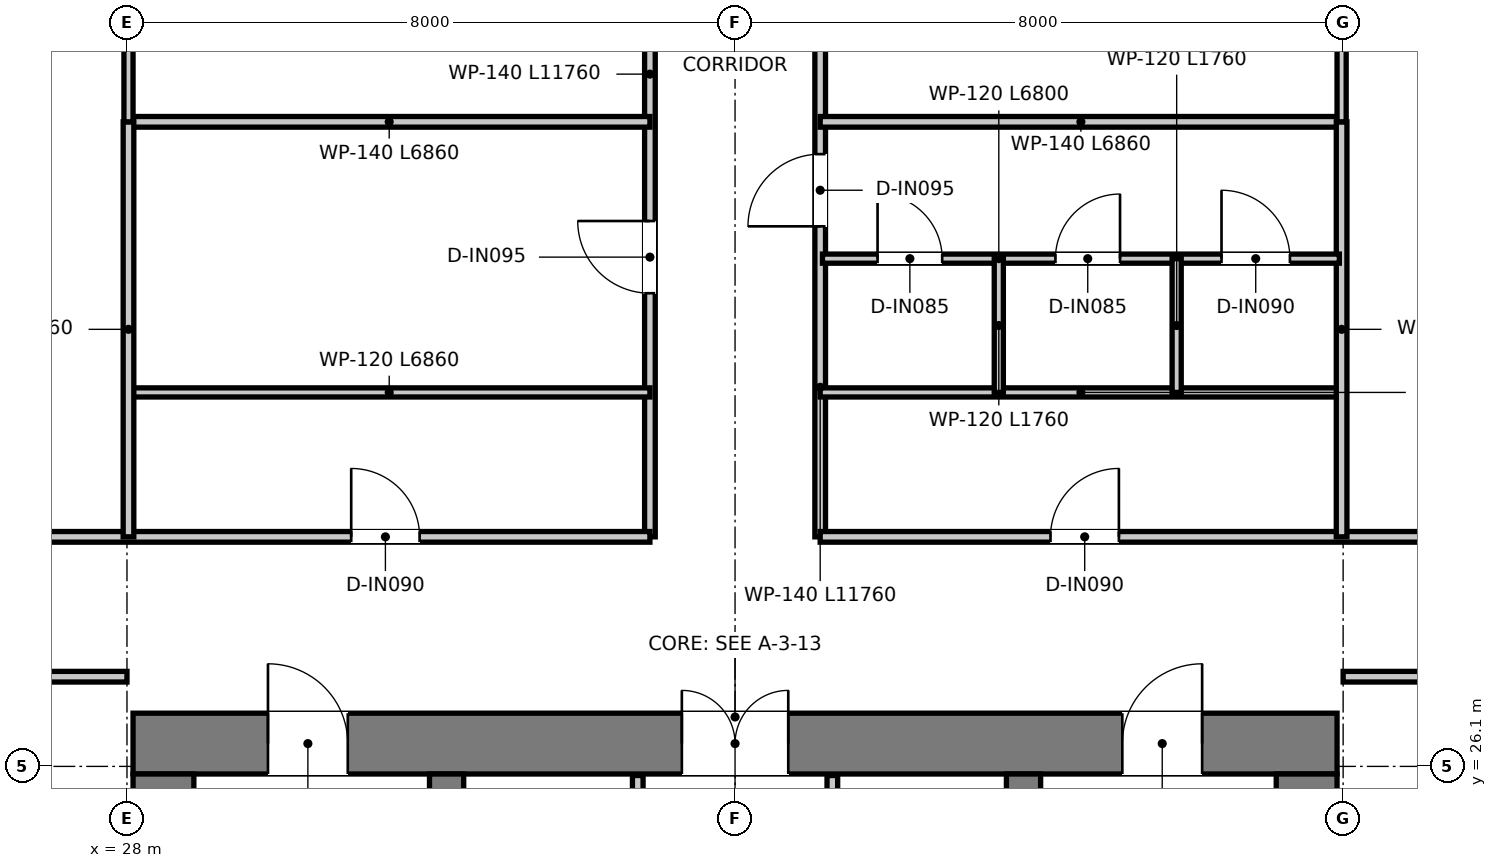
"""IFC4 building model, lengths in metres.
Left out: names, types, materials, properties, quantities, classifications, styles, units other than length and angle.
Written with IfcOpenShell. Run it as: python <this file> out.ifc"""

import sys

from ifc_helpers import new_model, si_unit, direction, frame, frame_2d, origin, place, context, subcontext, project, spatial, rectangle, extrude, element, fill, save


model = new_model("IFC4")
c1 = context("Model", 3, precision=1e-05, world=origin(), true_north=direction((0.0, 1.0)))
c2 = subcontext(c1, "Body", "Model", "MODEL_VIEW")
j1 = project(units=[si_unit("LENGTHUNIT", "METRE"), si_unit("PLANEANGLEUNIT", "RADIAN")], contexts=[c1])
p1 = place(None, origin())
s1 = spatial("IfcSite", under=j1, at=p1, CompositionType="ELEMENT")
p2 = place(p1, origin())
s2 = spatial("IfcBuilding", under=s1, at=p2, CompositionType="ELEMENT")
p3 = place(p2, frame((0.0, 0.0, 150.15)))
s3 = spatial("IfcBuildingStorey", under=s2, at=p3, CompositionType="ELEMENT", Elevation=150.15)
p4 = place(p3, frame((28.08, 26.4, 0.0), z_axis=(0.0, 0.0, 1.0), x_axis=(1.0, 0.0, 0.0)))
e1 = element("IfcWall", 1, at=p4, inside=s3, PredefinedType="SHEAR", context=c2, shape_type="SweptSolid", body=[
    extrude(rectangle(XDim=15.84, YDim=0.8, at=frame_2d((7.92, 0.0))), origin(), (0.0, 0.0, 1.0), 3.95),
])
p5 = place(p4, frame((7.22, 0.0, 0.0)))
e2 = element("IfcOpeningElement", 2, at=p5, cuts=e1, PredefinedType="OPENING", context=c2, shape_type="SweptSolid", body=[
    extrude(rectangle(XDim=1.4, YDim=2.2, at=frame_2d((0.7, 1.1))), frame((0.0, 0.41, 0.0), z_axis=(0.0, -1.0, 0.0), x_axis=(1.0, 0.0, 0.0)), (0.0, 0.0, 1.0), 0.82),
])
p6 = place(p4, frame((1.775, 0.0, 0.0)))
e3 = element("IfcOpeningElement", 3, at=p6, cuts=e1, PredefinedType="OPENING", context=c2, shape_type="SweptSolid", body=[
    extrude(rectangle(XDim=1.05, YDim=2.1, at=frame_2d((0.525, 1.05))), frame((0.0, 0.41, 0.0), z_axis=(0.0, -1.0, 0.0), x_axis=(1.0, 0.0, 0.0)), (0.0, 0.0, 1.0), 0.82),
])
p7 = place(p4, frame((13.015, 0.0, 0.0)))
e4 = element("IfcOpeningElement", 4, at=p7, cuts=e1, PredefinedType="OPENING", context=c2, shape_type="SweptSolid", body=[
    extrude(rectangle(XDim=1.05, YDim=2.1, at=frame_2d((0.525, 1.05))), frame((0.0, 0.41, 0.0), z_axis=(0.0, -1.0, 0.0), x_axis=(1.0, 0.0, 0.0)), (0.0, 0.0, 1.0), 0.82),
])
for number, where, z_axis, x_axis in (
    (5, (28.48, 11.3, 0.0), (0.0, 0.0, 1.0), (0.0, 1.0, 0.0)),
    (6, (43.52, 11.3, 0.0), (0.0, 0.0, 1.0), (0.0, 1.0, 0.0)),
):
    element("IfcWall", number, at=place(p3, frame(where, z_axis=z_axis, x_axis=x_axis)), inside=s3, PredefinedType="SHEAR", context=c2, shape_type="SweptSolid", body=[
        extrude(rectangle(XDim=14.7, YDim=0.8, at=frame_2d((7.35, 0.0))), origin(), (0.0, 0.0, 1.0), 3.95),
    ])
p8 = place(p3, frame((32.205, 13.22, 0.0), z_axis=(0.0, 0.0, 1.0), x_axis=(0.0, 1.0, 0.0)))
e7 = element("IfcWall", 7, at=p8, inside=s3, PredefinedType="SHEAR", context=c2, shape_type="SweptSolid", body=[
    extrude(rectangle(XDim=12.78, YDim=0.45, at=frame_2d((6.39, 0.0))), origin(), (0.0, 0.0, 1.0), 3.95),
])
p9 = place(p8, frame((10.58, 0.0, 0.0)))
e8 = element("IfcOpeningElement", 8, at=p9, cuts=e7, PredefinedType="OPENING", context=c2, shape_type="SweptSolid", body=[
    extrude(rectangle(XDim=1.1, YDim=2.15, at=frame_2d((0.55, 1.075))), frame((0.0, 0.235, 0.0), z_axis=(0.0, -1.0, 0.0), x_axis=(1.0, 0.0, 0.0)), (0.0, 0.0, 1.0), 0.47),
])
p10 = place(p3, frame((39.795, 13.22, 0.0), z_axis=(0.0, 0.0, 1.0), x_axis=(0.0, 1.0, 0.0)))
e9 = element("IfcWall", 9, at=p10, inside=s3, PredefinedType="SHEAR", context=c2, shape_type="SweptSolid", body=[
    extrude(rectangle(XDim=12.78, YDim=0.45, at=frame_2d((6.39, 0.0))), origin(), (0.0, 0.0, 1.0), 3.95),
])
p11 = place(p10, frame((10.58, 0.0, 0.0)))
e10 = element("IfcOpeningElement", 10, at=p11, cuts=e9, PredefinedType="OPENING", context=c2, shape_type="SweptSolid", body=[
    extrude(rectangle(XDim=1.1, YDim=2.15, at=frame_2d((0.55, 1.075))), frame((0.0, 0.235, 0.0), z_axis=(0.0, -1.0, 0.0), x_axis=(1.0, 0.0, 0.0)), (0.0, 0.0, 1.0), 0.47),
])
p12 = place(p3, frame((34.72, 20.2, 0.0), z_axis=(0.0, 0.0, 1.0), x_axis=(0.0, 1.0, 0.0)))
e11 = element("IfcWall", 11, at=p12, inside=s3, PredefinedType="PARTITIONING", context=c2, shape_type="SweptSolid", body=[
    extrude(rectangle(XDim=5.78, YDim=0.14, at=frame_2d((2.89, 0.0))), origin(), (0.0, 0.0, 1.0), 2.67),
])
p13 = place(p12, frame((1.05, 0.0, 0.0)))
e12 = element("IfcOpeningElement", 12, at=p13, cuts=e11, PredefinedType="OPENING", context=c2, shape_type="SweptSolid", body=[
    extrude(rectangle(XDim=0.9, YDim=2.1, at=frame_2d((0.45, 1.05))), frame((0.0, 0.08, 0.0), z_axis=(0.0, -1.0, 0.0), x_axis=(1.0, 0.0, 0.0)), (0.0, 0.0, 1.0), 0.16),
])
p14 = place(p3, frame((37.28, 20.2, 0.0), z_axis=(0.0, 0.0, 1.0), x_axis=(0.0, 1.0, 0.0)))
e13 = element("IfcWall", 13, at=p14, inside=s3, PredefinedType="PARTITIONING", context=c2, shape_type="SweptSolid", body=[
    extrude(rectangle(XDim=5.78, YDim=0.14, at=frame_2d((2.89, 0.0))), origin(), (0.0, 0.0, 1.0), 2.67),
])
p15 = place(p14, frame((0.95, 0.0, 0.0)))
e14 = element("IfcOpeningElement", 14, at=p15, cuts=e13, PredefinedType="OPENING", context=c2, shape_type="SweptSolid", body=[
    extrude(rectangle(XDim=1.1, YDim=2.15, at=frame_2d((0.55, 1.075))), frame((0.0, 0.08, 0.0), z_axis=(0.0, -1.0, 0.0), x_axis=(1.0, 0.0, 0.0)), (0.0, 0.0, 1.0), 0.16),
])
p16 = place(p3, frame((34.88, 29.12, 0.0), z_axis=(0.0, 0.0, 1.0), x_axis=(0.0, 1.0, 0.0)))
e15 = element("IfcWall", 15, at=p16, inside=s3, PredefinedType="PARTITIONING", context=c2, shape_type="SweptSolid", body=[
    extrude(rectangle(XDim=11.76, YDim=0.14, at=frame_2d((5.88, 0.0))), origin(), (0.0, 0.0, 1.0), 3.03),
])
p17 = place(p16, frame((3.205, 0.0, 0.0)))
e16 = element("IfcOpeningElement", 16, at=p17, cuts=e15, PredefinedType="OPENING", context=c2, shape_type="SweptSolid", body=[
    extrude(rectangle(XDim=0.95, YDim=2.1, at=frame_2d((0.475, 1.05))), frame((0.0, 0.08, 0.0), z_axis=(0.0, -1.0, 0.0), x_axis=(1.0, 0.0, 0.0)), (0.0, 0.0, 1.0), 0.16),
])
p18 = place(p16, frame((8.02, 0.0, 0.0)))
e17 = element("IfcOpeningElement", 17, at=p18, cuts=e15, PredefinedType="OPENING", context=c2, shape_type="SweptSolid", body=[
    extrude(rectangle(XDim=0.9, YDim=2.1, at=frame_2d((0.45, 1.05))), frame((0.0, 0.08, 0.0), z_axis=(0.0, -1.0, 0.0), x_axis=(1.0, 0.0, 0.0)), (0.0, 0.0, 1.0), 0.16),
])
p19 = place(p3, frame((37.12, 29.12, 0.0), z_axis=(0.0, 0.0, 1.0), x_axis=(0.0, 1.0, 0.0)))
e18 = element("IfcWall", 18, at=p19, inside=s3, PredefinedType="PARTITIONING", context=c2, shape_type="SweptSolid", body=[
    extrude(rectangle(XDim=11.76, YDim=0.14, at=frame_2d((5.88, 0.0))), origin(), (0.0, 0.0, 1.0), 3.03),
])
p20 = place(p19, frame((4.085, 0.0, 0.0)))
e19 = element("IfcOpeningElement", 19, at=p20, cuts=e18, PredefinedType="OPENING", context=c2, shape_type="SweptSolid", body=[
    extrude(rectangle(XDim=0.95, YDim=2.1, at=frame_2d((0.475, 1.05))), frame((0.0, 0.08, 0.0), z_axis=(0.0, -1.0, 0.0), x_axis=(1.0, 0.0, 0.0)), (0.0, 0.0, 1.0), 0.16),
])
p21 = place(p19, frame((8.02, 0.0, 0.0)))
e20 = element("IfcOpeningElement", 20, at=p21, cuts=e18, PredefinedType="OPENING", context=c2, shape_type="SweptSolid", body=[
    extrude(rectangle(XDim=0.9, YDim=2.1, at=frame_2d((0.45, 1.05))), frame((0.0, 0.08, 0.0), z_axis=(0.0, -1.0, 0.0), x_axis=(1.0, 0.0, 0.0)), (0.0, 0.0, 1.0), 0.16),
])
p22 = place(p3, frame((12.65, 29.12, 0.0), z_axis=(0.0, 0.0, 1.0), x_axis=(1.0, 0.0, 0.0)))
e21 = element("IfcWall", 21, at=p22, inside=s3, PredefinedType="PARTITIONING", context=c2, shape_type="SweptSolid", body=[
    extrude(rectangle(XDim=22.229, YDim=0.14, at=frame_2d((11.115, 0.0))), origin(), (0.0, 0.0, 1.0), 3.03),
])
p23 = place(p22, frame((18.3, 0.0, 0.0)))
e22 = element("IfcOpeningElement", 22, at=p23, cuts=e21, PredefinedType="OPENING", context=c2, shape_type="SweptSolid", body=[
    extrude(rectangle(XDim=0.9, YDim=2.1, at=frame_2d((0.45, 1.05))), frame((0.0, 0.08, 0.0), z_axis=(0.0, -1.0, 0.0), x_axis=(1.0, 0.0, 0.0)), (0.0, 0.0, 1.0), 0.16),
])
p24 = place(p22, frame((5.513, 0.0, 0.0)))
e23 = element("IfcOpeningElement", 23, at=p24, cuts=e21, PredefinedType="OPENING", context=c2, shape_type="SweptSolid", body=[
    extrude(rectangle(XDim=0.9, YDim=2.1, at=frame_2d((0.45, 1.05))), frame((0.0, 0.08, 0.0), z_axis=(0.0, -1.0, 0.0), x_axis=(1.0, 0.0, 0.0)), (0.0, 0.0, 1.0), 0.16),
])
p25 = place(p3, frame((37.12, 29.12, 0.0), z_axis=(0.0, 0.0, 1.0), x_axis=(1.0, 0.0, 0.0)))
e24 = element("IfcWall", 24, at=p25, inside=s3, PredefinedType="PARTITIONING", context=c2, shape_type="SweptSolid", body=[
    extrude(rectangle(XDim=24.763, YDim=0.14, at=frame_2d((12.381, 0.0))), origin(), (0.0, 0.0, 1.0), 3.03),
])
p26 = place(p25, frame((3.03, 0.0, 0.0)))
e25 = element("IfcOpeningElement", 25, at=p26, cuts=e24, PredefinedType="OPENING", context=c2, shape_type="SweptSolid", body=[
    extrude(rectangle(XDim=0.9, YDim=2.1, at=frame_2d((0.45, 1.05))), frame((0.0, 0.08, 0.0), z_axis=(0.0, -1.0, 0.0), x_axis=(1.0, 0.0, 0.0)), (0.0, 0.0, 1.0), 0.16),
])
p27 = place(p25, frame((8.52, 0.0, 0.0)))
e26 = element("IfcOpeningElement", 26, at=p27, cuts=e24, PredefinedType="OPENING", context=c2, shape_type="SweptSolid", body=[
    extrude(rectangle(XDim=0.9, YDim=2.1, at=frame_2d((0.45, 1.05))), frame((0.0, 0.08, 0.0), z_axis=(0.0, -1.0, 0.0), x_axis=(1.0, 0.0, 0.0)), (0.0, 0.0, 1.0), 0.16),
])
p28 = place(p25, frame((12.13, 0.0, 0.0)))
e27 = element("IfcOpeningElement", 27, at=p28, cuts=e24, PredefinedType="OPENING", context=c2, shape_type="SweptSolid", body=[
    extrude(rectangle(XDim=0.9, YDim=2.1, at=frame_2d((0.45, 1.05))), frame((0.0, 0.08, 0.0), z_axis=(0.0, -1.0, 0.0), x_axis=(1.0, 0.0, 0.0)), (0.0, 0.0, 1.0), 0.16),
])
p29 = place(p25, frame((19.217, 0.0, 0.0)))
e28 = element("IfcOpeningElement", 28, at=p29, cuts=e24, PredefinedType="OPENING", context=c2, shape_type="SweptSolid", body=[
    extrude(rectangle(XDim=0.9, YDim=2.1, at=frame_2d((0.45, 1.05))), frame((0.0, 0.08, 0.0), z_axis=(0.0, -1.0, 0.0), x_axis=(1.0, 0.0, 0.0)), (0.0, 0.0, 1.0), 0.16),
])
p30 = place(p3, frame((11.687, 27.28, 0.0), z_axis=(0.0, 0.0, 1.0), x_axis=(1.0, 0.0, 0.0)))
e29 = element("IfcWall", 29, at=p30, inside=s3, PredefinedType="PARTITIONING", context=c2, shape_type="SweptSolid", body=[
    extrude(rectangle(XDim=16.313, YDim=0.14, at=frame_2d((8.156, 0.0))), origin(), (0.0, 0.0, 1.0), 3.03),
])
p31 = place(p30, frame((6.376, 0.0, 0.0)))
e30 = element("IfcOpeningElement", 30, at=p31, cuts=e29, PredefinedType="OPENING", context=c2, shape_type="SweptSolid", body=[
    extrude(rectangle(XDim=0.9, YDim=2.1, at=frame_2d((0.45, 1.05))), frame((0.0, 0.08, 0.0), z_axis=(0.0, -1.0, 0.0), x_axis=(1.0, 0.0, 0.0)), (0.0, 0.0, 1.0), 0.16),
])
p32 = place(p3, frame((44.0, 27.28, 0.0), z_axis=(0.0, 0.0, 1.0), x_axis=(1.0, 0.0, 0.0)))
e31 = element("IfcWall", 31, at=p32, inside=s3, PredefinedType="PARTITIONING", context=c2, shape_type="SweptSolid", body=[
    extrude(rectangle(XDim=16.92, YDim=0.14, at=frame_2d((8.46, 0.0))), origin(), (0.0, 0.0, 1.0), 3.03),
])
p33 = place(p32, frame((2.1, 0.0, 0.0)))
e32 = element("IfcOpeningElement", 32, at=p33, cuts=e31, PredefinedType="OPENING", context=c2, shape_type="SweptSolid", body=[
    extrude(rectangle(XDim=0.9, YDim=2.1, at=frame_2d((0.45, 1.05))), frame((0.0, 0.08, 0.0), z_axis=(0.0, -1.0, 0.0), x_axis=(1.0, 0.0, 0.0)), (0.0, 0.0, 1.0), 0.16),
])
p34 = place(p32, frame((10.987, 0.0, 0.0)))
e33 = element("IfcOpeningElement", 33, at=p34, cuts=e31, PredefinedType="OPENING", context=c2, shape_type="SweptSolid", body=[
    extrude(rectangle(XDim=0.9, YDim=2.1, at=frame_2d((0.45, 1.05))), frame((0.0, 0.08, 0.0), z_axis=(0.0, -1.0, 0.0), x_axis=(1.0, 0.0, 0.0)), (0.0, 0.0, 1.0), 0.16),
])
for number, where, z_axis, x_axis in (
    (34, (28.02, 31.02, 0.0), (0.0, 0.0, 1.0), (1.0, 0.0, 0.0)),
    (35, (37.12, 31.02, 0.0), (0.0, 0.0, 1.0), (1.0, 0.0, 0.0)),
):
    element("IfcWall", number, at=place(p3, frame(where, z_axis=z_axis, x_axis=x_axis)), inside=s3, PredefinedType="PARTITIONING", context=c2, shape_type="SweptSolid", body=[
        extrude(rectangle(XDim=6.86, YDim=0.12, at=frame_2d((3.43, 0.0))), origin(), (0.0, 0.0, 1.0), 3.08),
    ])
for number, where, z_axis, x_axis in (
    (36, (28.02, 34.58, 0.0), (0.0, 0.0, 1.0), (1.0, 0.0, 0.0)),
    (37, (37.12, 34.58, 0.0), (0.0, 0.0, 1.0), (1.0, 0.0, 0.0)),
):
    element("IfcWall", number, at=place(p3, frame(where, z_axis=z_axis, x_axis=x_axis)), inside=s3, PredefinedType="PARTITIONING", context=c2, shape_type="SweptSolid", body=[
        extrude(rectangle(XDim=6.86, YDim=0.14, at=frame_2d((3.43, 0.0))), origin(), (0.0, 0.0, 1.0), 3.08),
    ])
for number, where, z_axis, x_axis in (
    (38, (28.02, 29.12, 0.0), (0.0, 0.0, 1.0), (0.0, 1.0, 0.0)),
    (39, (43.98, 29.12, 0.0), (0.0, 0.0, 1.0), (0.0, 1.0, 0.0)),
):
    element("IfcWall", number, at=place(p3, frame(where, z_axis=z_axis, x_axis=x_axis)), inside=s3, PredefinedType="PARTITIONING", context=c2, shape_type="SweptSolid", body=[
        extrude(rectangle(XDim=5.46, YDim=0.14, at=frame_2d((2.73, 0.0))), origin(), (0.0, 0.0, 1.0), 3.31),
    ])
p35 = place(p3, frame((37.15, 32.78, 0.0), z_axis=(0.0, 0.0, 1.0), x_axis=(1.0, 0.0, 0.0)))
e40 = element("IfcWall", 40, at=p35, inside=s3, PredefinedType="PARTITIONING", context=c2, shape_type="SweptSolid", body=[
    extrude(rectangle(XDim=6.8, YDim=0.12, at=frame_2d((3.4, 0.0))), origin(), (0.0, 0.0, 1.0), 3.08),
])
p36 = place(p35, frame((0.725, 0.0, 0.0)))
e41 = element("IfcOpeningElement", 41, at=p36, cuts=e40, PredefinedType="OPENING", context=c2, shape_type="SweptSolid", body=[
    extrude(rectangle(XDim=0.85, YDim=2.1, at=frame_2d((0.425, 1.05))), frame((0.0, 0.07, 0.0), z_axis=(0.0, -1.0, 0.0), x_axis=(1.0, 0.0, 0.0)), (0.0, 0.0, 1.0), 0.14),
])
p37 = place(p35, frame((3.065, 0.0, 0.0)))
e42 = element("IfcOpeningElement", 42, at=p37, cuts=e40, PredefinedType="OPENING", context=c2, shape_type="SweptSolid", body=[
    extrude(rectangle(XDim=0.85, YDim=2.1, at=frame_2d((0.425, 1.05))), frame((0.0, 0.07, 0.0), z_axis=(0.0, -1.0, 0.0), x_axis=(1.0, 0.0, 0.0)), (0.0, 0.0, 1.0), 0.14),
])
p38 = place(p35, frame((5.25, 0.0, 0.0)))
e43 = element("IfcOpeningElement", 43, at=p38, cuts=e40, PredefinedType="OPENING", context=c2, shape_type="SweptSolid", body=[
    extrude(rectangle(XDim=0.9, YDim=2.1, at=frame_2d((0.45, 1.05))), frame((0.0, 0.07, 0.0), z_axis=(0.0, -1.0, 0.0), x_axis=(1.0, 0.0, 0.0)), (0.0, 0.0, 1.0), 0.14),
])
for number, where, z_axis, x_axis in (
    (44, (39.47, 31.02, 0.0), (0.0, 0.0, 1.0), (0.0, 1.0, 0.0)),
    (45, (41.81, 31.02, 0.0), (0.0, 0.0, 1.0), (0.0, 1.0, 0.0)),
):
    element("IfcWall", number, at=place(p3, frame(where, z_axis=z_axis, x_axis=x_axis)), inside=s3, PredefinedType="PARTITIONING", context=c2, shape_type="SweptSolid", body=[
        extrude(rectangle(XDim=1.76, YDim=0.12, at=frame_2d((0.88, 0.0))), origin(), (0.0, 0.0, 1.0), 3.67),
    ])
p39 = place(p3, frame((28.02, 34.58, 0.0), z_axis=(0.0, 0.0, 1.0), x_axis=(0.0, 1.0, 0.0)))
e46 = element("IfcWall", 46, at=p39, inside=s3, PredefinedType="PARTITIONING", context=c2, shape_type="SweptSolid", body=[
    extrude(rectangle(XDim=15.681, YDim=0.12, at=frame_2d((7.841, 0.0))), origin(), (0.0, 0.0, 1.0), 3.03),
])
p40 = place(p3, frame((43.98, 34.58, 0.0), z_axis=(0.0, 0.0, 1.0), x_axis=(0.0, 1.0, 0.0)))
e47 = element("IfcWall", 47, at=p40, inside=s3, PredefinedType="PARTITIONING", context=c2, shape_type="SweptSolid", body=[
    extrude(rectangle(XDim=12.56, YDim=0.12, at=frame_2d((6.28, 0.0))), origin(), (0.0, 0.0, 1.0), 3.03),
])
p41 = place(p5, origin())
e48 = element("IfcDoor", 48, at=p41, inside=s3, OperationType="DOUBLE_DOOR_SINGLE_SWING", PredefinedType="DOOR", context=c2, shape_type="SweptSolid", body=[
    extrude(rectangle(XDim=1.4, YDim=2.2, at=frame_2d((0.7, 1.1))), frame((0.0, 0.025, 0.0), z_axis=(0.0, -1.0, 0.0), x_axis=(1.0, 0.0, 0.0)), (0.0, 0.0, 1.0), 0.05),
])
fill(e2, e48)
p42 = place(p6, origin())
e49 = element("IfcDoor", 49, at=p42, inside=s3, OperationType="SINGLE_SWING_LEFT", PredefinedType="DOOR", context=c2, shape_type="SweptSolid", body=[
    extrude(rectangle(XDim=1.05, YDim=2.1, at=frame_2d((0.525, 1.05))), frame((0.0, 0.025, 0.0), z_axis=(0.0, -1.0, 0.0), x_axis=(1.0, 0.0, 0.0)), (0.0, 0.0, 1.0), 0.05),
])
fill(e3, e49)
p43 = place(p7, origin())
e50 = element("IfcDoor", 50, at=p43, inside=s3, OperationType="SINGLE_SWING_RIGHT", PredefinedType="DOOR", context=c2, shape_type="SweptSolid", body=[
    extrude(rectangle(XDim=1.05, YDim=2.1, at=frame_2d((0.525, 1.05))), frame((0.0, 0.025, 0.0), z_axis=(0.0, -1.0, 0.0), x_axis=(1.0, 0.0, 0.0)), (0.0, 0.0, 1.0), 0.05),
])
fill(e4, e50)
p44 = place(p23, origin())
e51 = element("IfcDoor", 51, at=p44, inside=s3, OperationType="SINGLE_SWING_LEFT", PredefinedType="DOOR", context=c2, shape_type="SweptSolid", body=[
    extrude(rectangle(XDim=0.9, YDim=2.1, at=frame_2d((0.45, 1.05))), frame((0.0, 0.025, 0.0), z_axis=(0.0, -1.0, 0.0), x_axis=(1.0, 0.0, 0.0)), (0.0, 0.0, 1.0), 0.05),
])
fill(e22, e51)
p45 = place(p26, origin())
e52 = element("IfcDoor", 52, at=p45, inside=s3, OperationType="SINGLE_SWING_RIGHT", PredefinedType="DOOR", context=c2, shape_type="SweptSolid", body=[
    extrude(rectangle(XDim=0.9, YDim=2.1, at=frame_2d((0.45, 1.05))), frame((0.0, 0.025, 0.0), z_axis=(0.0, -1.0, 0.0), x_axis=(1.0, 0.0, 0.0)), (0.0, 0.0, 1.0), 0.05),
])
fill(e25, e52)
p46 = place(p20, origin())
e53 = element("IfcDoor", 53, at=p46, inside=s3, OperationType="SINGLE_SWING_LEFT", PredefinedType="DOOR", context=c2, shape_type="SweptSolid", body=[
    extrude(rectangle(XDim=0.95, YDim=2.1, at=frame_2d((0.475, 1.05))), frame((0.0, 0.025, 0.0), z_axis=(0.0, -1.0, 0.0), x_axis=(1.0, 0.0, 0.0)), (0.0, 0.0, 1.0), 0.05),
])
fill(e19, e53)
p47 = place(p17, origin())
e54 = element("IfcDoor", 54, at=p47, inside=s3, OperationType="SINGLE_SWING_RIGHT", PredefinedType="DOOR", context=c2, shape_type="SweptSolid", body=[
    extrude(rectangle(XDim=0.95, YDim=2.1, at=frame_2d((0.475, 1.05))), frame((0.0, 0.025, 0.0), z_axis=(0.0, -1.0, 0.0), x_axis=(1.0, 0.0, 0.0)), (0.0, 0.0, 1.0), 0.05),
])
fill(e16, e54)
p48 = place(p36, origin())
e55 = element("IfcDoor", 55, at=p48, inside=s3, OperationType="SINGLE_SWING_LEFT", PredefinedType="DOOR", context=c2, shape_type="SweptSolid", body=[
    extrude(rectangle(XDim=0.85, YDim=2.1, at=frame_2d((0.425, 1.05))), frame((0.0, 0.025, 0.0), z_axis=(0.0, -1.0, 0.0), x_axis=(1.0, 0.0, 0.0)), (0.0, 0.0, 1.0), 0.05),
])
fill(e41, e55)
p49 = place(p37, origin())
e56 = element("IfcDoor", 56, at=p49, inside=s3, OperationType="SINGLE_SWING_RIGHT", PredefinedType="DOOR", context=c2, shape_type="SweptSolid", body=[
    extrude(rectangle(XDim=0.85, YDim=2.1, at=frame_2d((0.425, 1.05))), frame((0.0, 0.025, 0.0), z_axis=(0.0, -1.0, 0.0), x_axis=(1.0, 0.0, 0.0)), (0.0, 0.0, 1.0), 0.05),
])
fill(e42, e56)
p50 = place(p38, origin())
e57 = element("IfcDoor", 57, at=p50, inside=s3, OperationType="SINGLE_SWING_LEFT", PredefinedType="DOOR", context=c2, shape_type="SweptSolid", body=[
    extrude(rectangle(XDim=0.9, YDim=2.1, at=frame_2d((0.45, 1.05))), frame((0.0, 0.025, 0.0), z_axis=(0.0, -1.0, 0.0), x_axis=(1.0, 0.0, 0.0)), (0.0, 0.0, 1.0), 0.05),
])
fill(e43, e57)
save(model, sys.argv[1])
